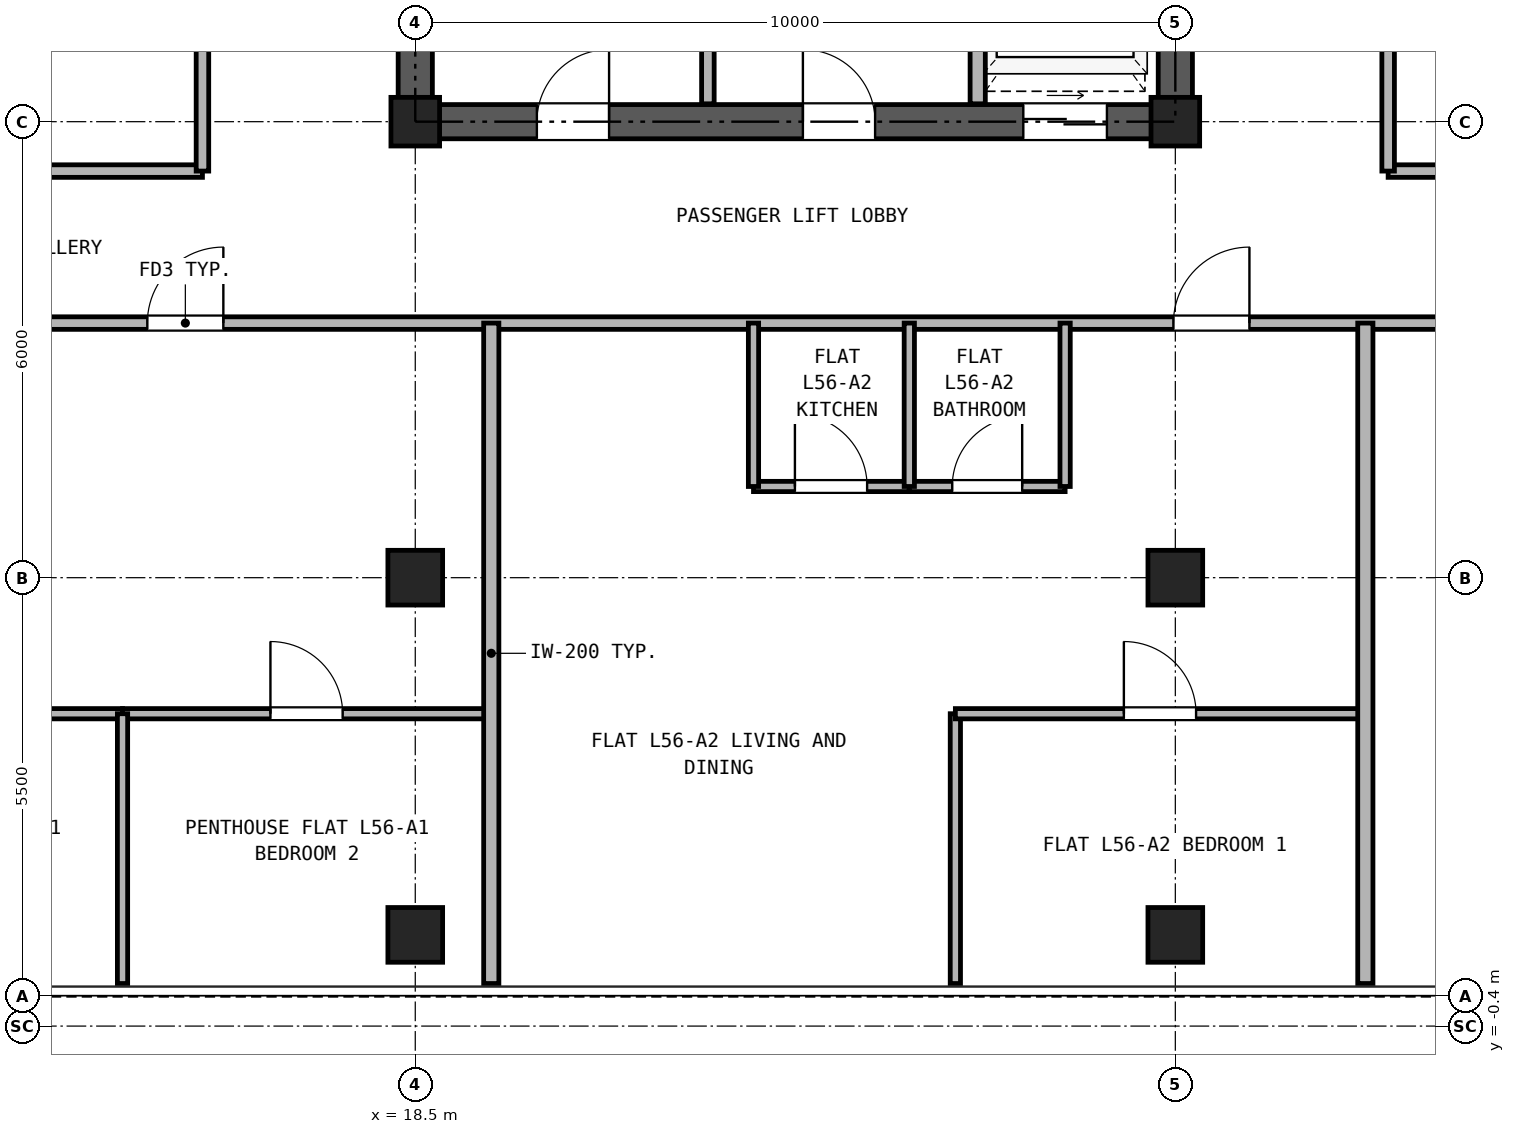
"""IFC4 building model, lengths in metres.
Left out: names, types, materials, properties, quantities, classifications, styles, units other than length and angle.
Written with IfcOpenShell. Run it as: python <this file> out.ifc"""

import sys

from ifc_helpers import new_model, si_unit, direction, frame, frame_2d, origin, origin_2d, place, context, subcontext, project, spatial, rectangle, hollow_rectangle, extrude, source, transform, mapped, element, fill, save


model = new_model("IFC4")
c1 = context("Model", 3, precision=1e-05, world=origin(), true_north=direction((0.0, 1.0)))
c2 = subcontext(c1, "Body", "Model", "MODEL_VIEW")
j1 = project(units=[si_unit("LENGTHUNIT", "METRE"), si_unit("PLANEANGLEUNIT", "RADIAN")], contexts=[c1])
p1 = place(None, origin())
s1 = spatial("IfcSite", under=j1, at=p1, CompositionType="ELEMENT")
p2 = place(p1, origin())
s2 = spatial("IfcBuilding", under=s1, at=p2, CompositionType="ELEMENT")
p3 = place(p2, frame((0.0, 0.0, 199.6)))
s3 = spatial("IfcBuildingStorey", under=s2, at=p3, CompositionType="ELEMENT", Elevation=199.6)
m1 = source(origin(), c2, "Body", "SweptSolid", [
    extrude(hollow_rectangle(XDim=0.72, YDim=0.72, WallThickness=0.04, at=origin_2d()), origin(), (0.0, 0.0, 1.0), 2.95),
])
for number, where, z_axis, x_axis in (
    (1, (18.5, 0.8, 0.0), (0.0, 0.0, 1.0), (1.0, 0.0, 0.0)),
    (2, (28.5, 0.8, 0.0), (0.0, 0.0, 1.0), (1.0, 0.0, 0.0)),
    (3, (18.5, 5.5, 0.0), (0.0, 0.0, 1.0), (1.0, 0.0, 0.0)),
):
    element("IfcColumn", number, at=place(p3, frame(where, z_axis=z_axis, x_axis=x_axis)), inside=s3, PredefinedType="COLUMN", context=c2, shape_type="MappedRepresentation", body=[
        mapped(m1, transform((0.0, 0.0, 0.0), x_axis=(1.0, 0.0, 0.0), y_axis=(0.0, 1.0, 0.0), z_axis=(0.0, 0.0, 1.0), scale=1.0)),
    ])
m2 = source(origin(), c2, "Body", "SweptSolid", [
    extrude(hollow_rectangle(XDim=0.64, YDim=0.64, WallThickness=0.035, at=origin_2d()), origin(), (0.0, 0.0, 1.0), 2.95),
])
p4 = place(p3, frame((18.5, 11.5, 0.0), z_axis=(0.0, 0.0, 1.0), x_axis=(1.0, 0.0, 0.0)))
e4 = element("IfcColumn", 4, at=p4, inside=s3, PredefinedType="COLUMN", context=c2, shape_type="MappedRepresentation", body=[
    mapped(m2, transform((0.0, 0.0, 0.0), x_axis=(1.0, 0.0, 0.0), y_axis=(0.0, 1.0, 0.0), z_axis=(0.0, 0.0, 1.0), scale=1.0)),
])
p5 = place(p3, frame((28.5, 5.5, 0.0), z_axis=(0.0, 0.0, 1.0), x_axis=(1.0, 0.0, 0.0)))
e5 = element("IfcColumn", 5, at=p5, inside=s3, PredefinedType="COLUMN", context=c2, shape_type="MappedRepresentation", body=[
    mapped(m1, transform((0.0, 0.0, 0.0), x_axis=(1.0, 0.0, 0.0), y_axis=(0.0, 1.0, 0.0), z_axis=(0.0, 0.0, 1.0), scale=1.0)),
])
p6 = place(p3, frame((28.5, 11.5, 0.0), z_axis=(0.0, 0.0, 1.0), x_axis=(1.0, 0.0, 0.0)))
e6 = element("IfcColumn", 6, at=p6, inside=s3, PredefinedType="COLUMN", context=c2, shape_type="MappedRepresentation", body=[
    mapped(m2, transform((0.0, 0.0, 0.0), x_axis=(1.0, 0.0, 0.0), y_axis=(0.0, 1.0, 0.0), z_axis=(0.0, 0.0, 1.0), scale=1.0)),
])
p7 = place(p3, frame((18.275, 11.5, 0.0), z_axis=(0.0, 0.0, 1.0), x_axis=(1.0, 0.0, 0.0)))
e7 = element("IfcWall", 7, at=p7, inside=s3, PredefinedType="SHEAR", context=c2, shape_type="SweptSolid", body=[
    extrude(rectangle(XDim=10.45, YDim=0.45, at=frame_2d((5.225, 0.0))), origin(), (0.0, 0.0, 1.0), 2.95),
])
p8 = place(p7, frame((1.825, 0.0, 0.0)))
e8 = element("IfcOpeningElement", 8, at=p8, cuts=e7, PredefinedType="OPENING", context=c2, shape_type="SweptSolid", body=[
    extrude(rectangle(XDim=0.95, YDim=2.15, at=frame_2d((0.475, 1.075))), frame((0.0, 0.235, 0.0), z_axis=(0.0, -1.0, 0.0), x_axis=(1.0, 0.0, 0.0)), (0.0, 0.0, 1.0), 0.47),
])
p9 = place(p7, frame((5.325, 0.0, 0.0)))
e9 = element("IfcOpeningElement", 9, at=p9, cuts=e7, PredefinedType="OPENING", context=c2, shape_type="SweptSolid", body=[
    extrude(rectangle(XDim=0.95, YDim=2.15, at=frame_2d((0.475, 1.075))), frame((0.0, 0.235, 0.0), z_axis=(0.0, -1.0, 0.0), x_axis=(1.0, 0.0, 0.0)), (0.0, 0.0, 1.0), 0.47),
])
p10 = place(p7, frame((8.225, 0.0, 0.0)))
e10 = element("IfcOpeningElement", 10, at=p10, cuts=e7, PredefinedType="OPENING", context=c2, shape_type="SweptSolid", body=[
    extrude(rectangle(XDim=1.1, YDim=2.25, at=frame_2d((0.55, 1.125))), frame((0.0, 0.235, 0.0), z_axis=(0.0, -1.0, 0.0), x_axis=(1.0, 0.0, 0.0)), (0.0, 0.0, 1.0), 0.47),
])
p11 = place(p3, frame((18.5, 11.725, 0.0), z_axis=(0.0, 0.0, 1.0), x_axis=(0.0, 1.0, 0.0)))
e11 = element("IfcWall", 11, at=p11, inside=s3, PredefinedType="SHEAR", context=c2, shape_type="SweptSolid", body=[
    extrude(rectangle(XDim=16.8, YDim=0.45, at=frame_2d((8.4, 0.0))), origin(), (0.0, 0.0, 1.0), 2.95),
])
p12 = place(p11, frame((7.425, 0.0, 0.0)))
e12 = element("IfcOpeningElement", 12, at=p12, cuts=e11, PredefinedType="OPENING", context=c2, shape_type="SweptSolid", body=[
    extrude(rectangle(XDim=1.15, YDim=2.2, at=frame_2d((0.575, 1.1))), frame((0.0, 0.235, 0.0), z_axis=(0.0, -1.0, 0.0), x_axis=(1.0, 0.0, 0.0)), (0.0, 0.0, 1.0), 0.47),
])
p13 = place(p3, frame((28.5, 11.725, 0.0), z_axis=(0.0, 0.0, 1.0), x_axis=(0.0, 1.0, 0.0)))
e13 = element("IfcWall", 13, at=p13, inside=s3, PredefinedType="SHEAR", context=c2, shape_type="SweptSolid", body=[
    extrude(rectangle(XDim=16.8, YDim=0.45, at=frame_2d((8.4, 0.0))), origin(), (0.0, 0.0, 1.0), 2.95),
])
p14 = place(p13, frame((7.425, 0.0, 0.0)))
e14 = element("IfcOpeningElement", 14, at=p14, cuts=e13, PredefinedType="OPENING", context=c2, shape_type="SweptSolid", body=[
    extrude(rectangle(XDim=1.15, YDim=2.2, at=frame_2d((0.575, 1.1))), frame((0.0, 0.235, 0.0), z_axis=(0.0, -1.0, 0.0), x_axis=(1.0, 0.0, 0.0)), (0.0, 0.0, 1.0), 0.47),
])
p15 = place(p3, frame((22.35, 11.735, 0.0), z_axis=(0.0, 0.0, 1.0), x_axis=(0.0, 1.0, 0.0)))
e15 = element("IfcWall", 15, at=p15, inside=s3, PredefinedType="PARTITIONING", context=c2, shape_type="SweptSolid", body=[
    extrude(rectangle(XDim=3.265, YDim=0.165, at=frame_2d((1.632, 0.0))), origin(), (0.0, 0.0, 1.0), 2.95),
])
p16 = place(p3, frame((25.9, 11.735, 0.0), z_axis=(0.0, 0.0, 1.0), x_axis=(0.0, 1.0, 0.0)))
e16 = element("IfcWall", 16, at=p16, inside=s3, PredefinedType="PARTITIONING", context=c2, shape_type="SweptSolid", body=[
    extrude(rectangle(XDim=3.265, YDim=0.2, at=frame_2d((1.632, 0.0))), origin(), (0.0, 0.0, 1.0), 2.95),
])
p17 = place(p3, frame((0.16, 8.85, 0.0), z_axis=(0.0, 0.0, 1.0), x_axis=(1.0, 0.0, 0.0)))
e17 = element("IfcWall", 17, at=p17, inside=s3, PredefinedType="PARTITIONING", context=c2, shape_type="SweptSolid", body=[
    extrude(rectangle(XDim=41.48, YDim=0.165, at=frame_2d((20.74, 0.0))), origin(), (0.0, 0.0, 1.0), 2.95),
])
p18 = place(p17, frame((14.815, 0.0, 0.0)))
e18 = element("IfcOpeningElement", 18, at=p18, cuts=e17, PredefinedType="OPENING", context=c2, shape_type="SweptSolid", body=[
    extrude(rectangle(XDim=1.0, YDim=2.15, at=frame_2d((0.5, 1.075))), frame((0.0, 0.093, 0.0), z_axis=(0.0, -1.0, 0.0), x_axis=(1.0, 0.0, 0.0)), (0.0, 0.0, 1.0), 0.185),
])
p19 = place(p17, frame((28.315, 0.0, 0.0)))
e19 = element("IfcOpeningElement", 19, at=p19, cuts=e17, PredefinedType="OPENING", context=c2, shape_type="SweptSolid", body=[
    extrude(rectangle(XDim=1.0, YDim=2.15, at=frame_2d((0.5, 1.075))), frame((0.0, 0.093, 0.0), z_axis=(0.0, -1.0, 0.0), x_axis=(1.0, 0.0, 0.0)), (0.0, 0.0, 1.0), 0.185),
])
p20 = place(p17, frame((32.615, 0.0, 0.0)))
e20 = element("IfcOpeningElement", 20, at=p20, cuts=e17, PredefinedType="OPENING", context=c2, shape_type="SweptSolid", body=[
    extrude(rectangle(XDim=1.0, YDim=2.15, at=frame_2d((0.5, 1.075))), frame((0.0, 0.093, 0.0), z_axis=(0.0, -1.0, 0.0), x_axis=(1.0, 0.0, 0.0)), (0.0, 0.0, 1.0), 0.185),
])
p21 = place(p3, frame((7.6, 10.85, 0.0), z_axis=(0.0, 0.0, 1.0), x_axis=(1.0, 0.0, 0.0)))
e21 = element("IfcWall", 21, at=p21, inside=s3, PredefinedType="PARTITIONING", context=c2, shape_type="SweptSolid", body=[
    extrude(rectangle(XDim=8.1, YDim=0.165, at=frame_2d((4.05, 0.0))), origin(), (0.0, 0.0, 1.0), 2.95),
])
p22 = place(p3, frame((31.3, 10.85, 0.0), z_axis=(0.0, 0.0, 1.0), x_axis=(1.0, 0.0, 0.0)))
e22 = element("IfcWall", 22, at=p22, inside=s3, PredefinedType="PARTITIONING", context=c2, shape_type="SweptSolid", body=[
    extrude(rectangle(XDim=6.9, YDim=0.165, at=frame_2d((3.45, 0.0))), origin(), (0.0, 0.0, 1.0), 2.95),
])
p23 = place(p3, frame((15.7, 10.85, 0.0), z_axis=(0.0, 0.0, 1.0), x_axis=(0.0, 1.0, 0.0)))
e23 = element("IfcWall", 23, at=p23, inside=s3, PredefinedType="PARTITIONING", context=c2, shape_type="SweptSolid", body=[
    extrude(rectangle(XDim=24.29, YDim=0.165, at=frame_2d((12.145, 0.0))), origin(), (0.0, 0.0, 1.0), 2.95),
])
p24 = place(p23, frame((2.825, 0.0, 0.0)))
e24 = element("IfcOpeningElement", 24, at=p24, cuts=e23, PredefinedType="OPENING", context=c2, shape_type="SweptSolid", body=[
    extrude(rectangle(XDim=0.95, YDim=2.15, at=frame_2d((0.475, 1.075))), frame((0.0, 0.093, 0.0), z_axis=(0.0, -1.0, 0.0), x_axis=(1.0, 0.0, 0.0)), (0.0, 0.0, 1.0), 0.185),
])
p25 = place(p23, frame((9.15, 0.0, 0.0)))
e25 = element("IfcOpeningElement", 25, at=p25, cuts=e23, PredefinedType="OPENING", context=c2, shape_type="SweptSolid", body=[
    extrude(rectangle(XDim=0.95, YDim=2.15, at=frame_2d((0.475, 1.075))), frame((0.0, 0.093, 0.0), z_axis=(0.0, -1.0, 0.0), x_axis=(1.0, 0.0, 0.0)), (0.0, 0.0, 1.0), 0.185),
])
p26 = place(p23, frame((15.15, 0.0, 0.0)))
e26 = element("IfcOpeningElement", 26, at=p26, cuts=e23, PredefinedType="OPENING", context=c2, shape_type="SweptSolid", body=[
    extrude(rectangle(XDim=0.95, YDim=2.15, at=frame_2d((0.475, 1.075))), frame((0.0, 0.093, 0.0), z_axis=(0.0, -1.0, 0.0), x_axis=(1.0, 0.0, 0.0)), (0.0, 0.0, 1.0), 0.185),
])
p27 = place(p23, frame((20.97, 0.0, 0.0)))
e27 = element("IfcOpeningElement", 27, at=p27, cuts=e23, PredefinedType="OPENING", context=c2, shape_type="SweptSolid", body=[
    extrude(rectangle(XDim=0.95, YDim=2.15, at=frame_2d((0.475, 1.075))), frame((0.0, 0.093, 0.0), z_axis=(0.0, -1.0, 0.0), x_axis=(1.0, 0.0, 0.0)), (0.0, 0.0, 1.0), 0.185),
])
p28 = place(p3, frame((31.3, 10.85, 0.0), z_axis=(0.0, 0.0, 1.0), x_axis=(0.0, 1.0, 0.0)))
e28 = element("IfcWall", 28, at=p28, inside=s3, PredefinedType="PARTITIONING", context=c2, shape_type="SweptSolid", body=[
    extrude(rectangle(XDim=24.29, YDim=0.165, at=frame_2d((12.145, 0.0))), origin(), (0.0, 0.0, 1.0), 2.95),
])
p29 = place(p28, frame((3.675, 0.0, 0.0)))
e29 = element("IfcOpeningElement", 29, at=p29, cuts=e28, PredefinedType="OPENING", context=c2, shape_type="SweptSolid", body=[
    extrude(rectangle(XDim=1.0, YDim=2.15, at=frame_2d((0.5, 1.075))), frame((0.0, 0.093, 0.0), z_axis=(0.0, -1.0, 0.0), x_axis=(1.0, 0.0, 0.0)), (0.0, 0.0, 1.0), 0.185),
])
p30 = place(p28, frame((11.95, 0.0, 0.0)))
e30 = element("IfcOpeningElement", 30, at=p30, cuts=e28, PredefinedType="OPENING", context=c2, shape_type="SweptSolid", body=[
    extrude(rectangle(XDim=1.0, YDim=2.15, at=frame_2d((0.5, 1.075))), frame((0.0, 0.093, 0.0), z_axis=(0.0, -1.0, 0.0), x_axis=(1.0, 0.0, 0.0)), (0.0, 0.0, 1.0), 0.185),
])
p31 = place(p28, frame((17.75, 0.0, 0.0)))
e31 = element("IfcOpeningElement", 31, at=p31, cuts=e28, PredefinedType="OPENING", context=c2, shape_type="SweptSolid", body=[
    extrude(rectangle(XDim=1.0, YDim=2.15, at=frame_2d((0.5, 1.075))), frame((0.0, 0.093, 0.0), z_axis=(0.0, -1.0, 0.0), x_axis=(1.0, 0.0, 0.0)), (0.0, 0.0, 1.0), 0.185),
])
p32 = place(p3, frame((9.797, 3.71, 0.0), z_axis=(0.0, 0.0, 1.0), x_axis=(1.0, 0.0, 0.0)))
e32 = element("IfcWall", 32, at=p32, inside=s3, PredefinedType="PARTITIONING", context=c2, shape_type="SweptSolid", body=[
    extrude(rectangle(XDim=4.851, YDim=0.135, at=frame_2d((2.426, 0.0))), origin(), (0.0, 0.0, 1.0), 2.95),
])
p33 = place(p32, frame((1.946, 0.0, 0.0)))
e33 = element("IfcOpeningElement", 33, at=p33, cuts=e32, PredefinedType="OPENING", context=c2, shape_type="SweptSolid", body=[
    extrude(rectangle(XDim=0.95, YDim=2.15, at=frame_2d((0.475, 1.075))), frame((0.0, 0.077, 0.0), z_axis=(0.0, -1.0, 0.0), x_axis=(1.0, 0.0, 0.0)), (0.0, 0.0, 1.0), 0.155),
])
p34 = place(p3, frame((14.648, 3.71, 0.0), z_axis=(0.0, 0.0, 1.0), x_axis=(1.0, 0.0, 0.0)))
e34 = element("IfcWall", 34, at=p34, inside=s3, PredefinedType="PARTITIONING", context=c2, shape_type="SweptSolid", body=[
    extrude(rectangle(XDim=4.852, YDim=0.135, at=frame_2d((2.426, 0.0))), origin(), (0.0, 0.0, 1.0), 2.95),
])
p35 = place(p34, frame((1.946, 0.0, 0.0)))
e35 = element("IfcOpeningElement", 35, at=p35, cuts=e34, PredefinedType="OPENING", context=c2, shape_type="SweptSolid", body=[
    extrude(rectangle(XDim=0.95, YDim=2.15, at=frame_2d((0.475, 1.075))), frame((0.0, 0.077, 0.0), z_axis=(0.0, -1.0, 0.0), x_axis=(1.0, 0.0, 0.0)), (0.0, 0.0, 1.0), 0.155),
])
p36 = place(p3, frame((14.648, 0.16, 0.0), z_axis=(0.0, 0.0, 1.0), x_axis=(0.0, 1.0, 0.0)))
e36 = element("IfcWall", 36, at=p36, inside=s3, PredefinedType="PARTITIONING", context=c2, shape_type="SweptSolid", body=[
    extrude(rectangle(XDim=3.55, YDim=0.135, at=frame_2d((1.775, 0.0))), origin(), (0.0, 0.0, 1.0), 2.95),
])
p37 = place(p3, frame((19.5, 0.16, 0.0), z_axis=(0.0, 0.0, 1.0), x_axis=(0.0, 1.0, 0.0)))
e37 = element("IfcWall", 37, at=p37, inside=s3, PredefinedType="PARTITIONING", context=c2, shape_type="SweptSolid", body=[
    extrude(rectangle(XDim=8.69, YDim=0.2, at=frame_2d((4.345, 0.0))), origin(), (0.0, 0.0, 1.0), 2.95),
])
p38 = place(p3, frame((22.95, 6.7, 0.0), z_axis=(0.0, 0.0, 1.0), x_axis=(1.0, 0.0, 0.0)))
e38 = element("IfcWall", 38, at=p38, inside=s3, PredefinedType="PARTITIONING", context=c2, shape_type="SweptSolid", body=[
    extrude(rectangle(XDim=2.05, YDim=0.135, at=frame_2d((1.025, 0.0))), origin(), (0.0, 0.0, 1.0), 2.95),
])
p39 = place(p38, frame((0.545, 0.0, 0.0)))
e39 = element("IfcOpeningElement", 39, at=p39, cuts=e38, PredefinedType="OPENING", context=c2, shape_type="SweptSolid", body=[
    extrude(rectangle(XDim=0.95, YDim=2.15, at=frame_2d((0.475, 1.075))), frame((0.0, 0.077, 0.0), z_axis=(0.0, -1.0, 0.0), x_axis=(1.0, 0.0, 0.0)), (0.0, 0.0, 1.0), 0.155),
])
p40 = place(p3, frame((25.0, 6.7, 0.0), z_axis=(0.0, 0.0, 1.0), x_axis=(1.0, 0.0, 0.0)))
e40 = element("IfcWall", 40, at=p40, inside=s3, PredefinedType="PARTITIONING", context=c2, shape_type="SweptSolid", body=[
    extrude(rectangle(XDim=2.05, YDim=0.135, at=frame_2d((1.025, 0.0))), origin(), (0.0, 0.0, 1.0), 2.95),
])
p41 = place(p40, frame((0.565, 0.0, 0.0)))
e41 = element("IfcOpeningElement", 41, at=p41, cuts=e40, PredefinedType="OPENING", context=c2, shape_type="SweptSolid", body=[
    extrude(rectangle(XDim=0.92, YDim=2.1, at=frame_2d((0.46, 1.05))), frame((0.0, 0.077, 0.0), z_axis=(0.0, -1.0, 0.0), x_axis=(1.0, 0.0, 0.0)), (0.0, 0.0, 1.0), 0.155),
])
for number, where, z_axis, x_axis in (
    (42, (22.95, 6.7, 0.0), (0.0, 0.0, 1.0), (0.0, 1.0, 0.0)),
    (43, (25.0, 6.7, 0.0), (0.0, 0.0, 1.0), (0.0, 1.0, 0.0)),
    (44, (27.05, 6.7, 0.0), (0.0, 0.0, 1.0), (0.0, 1.0, 0.0)),
):
    element("IfcWall", number, at=place(p3, frame(where, z_axis=z_axis, x_axis=x_axis)), inside=s3, PredefinedType="PARTITIONING", context=c2, shape_type="SweptSolid", body=[
        extrude(rectangle(XDim=2.15, YDim=0.135, at=frame_2d((1.075, 0.0))), origin(), (0.0, 0.0, 1.0), 2.95),
    ])
p42 = place(p3, frame((25.606, 0.16, 0.0), z_axis=(0.0, 0.0, 1.0), x_axis=(0.0, 1.0, 0.0)))
e45 = element("IfcWall", 45, at=p42, inside=s3, PredefinedType="PARTITIONING", context=c2, shape_type="SweptSolid", body=[
    extrude(rectangle(XDim=3.55, YDim=0.135, at=frame_2d((1.775, 0.0))), origin(), (0.0, 0.0, 1.0), 2.95),
])
p43 = place(p3, frame((25.606, 3.71, 0.0), z_axis=(0.0, 0.0, 1.0), x_axis=(1.0, 0.0, 0.0)))
e46 = element("IfcWall", 46, at=p43, inside=s3, PredefinedType="PARTITIONING", context=c2, shape_type="SweptSolid", body=[
    extrude(rectangle(XDim=5.394, YDim=0.135, at=frame_2d((2.697, 0.0))), origin(), (0.0, 0.0, 1.0), 2.95),
])
p44 = place(p43, frame((2.217, 0.0, 0.0)))
e47 = element("IfcOpeningElement", 47, at=p44, cuts=e46, PredefinedType="OPENING", context=c2, shape_type="SweptSolid", body=[
    extrude(rectangle(XDim=0.95, YDim=2.15, at=frame_2d((0.475, 1.075))), frame((0.0, 0.077, 0.0), z_axis=(0.0, -1.0, 0.0), x_axis=(1.0, 0.0, 0.0)), (0.0, 0.0, 1.0), 0.155),
])
p45 = place(p3, frame((31.0, 0.16, 0.0), z_axis=(0.0, 0.0, 1.0), x_axis=(0.0, 1.0, 0.0)))
e48 = element("IfcWall", 48, at=p45, inside=s3, PredefinedType="PARTITIONING", context=c2, shape_type="SweptSolid", body=[
    extrude(rectangle(XDim=8.69, YDim=0.2, at=frame_2d((4.345, 0.0))), origin(), (0.0, 0.0, 1.0), 2.95),
])
p46 = place(p8, frame((0.95, 0.0, 0.0), z_axis=(0.0, 0.0, 1.0), x_axis=(-1.0, 0.0, 0.0)))
e49 = element("IfcDoor", 49, at=p46, inside=s3, OperationType="SINGLE_SWING_RIGHT", PredefinedType="DOOR", context=c2, shape_type="SweptSolid", body=[
    extrude(rectangle(XDim=0.95, YDim=2.15, at=frame_2d((0.475, 1.075))), frame((0.0, 0.025, 0.0), z_axis=(0.0, -1.0, 0.0), x_axis=(1.0, 0.0, 0.0)), (0.0, 0.0, 1.0), 0.05),
])
fill(e8, e49)
p47 = place(p9, frame((0.95, 0.0, 0.0), z_axis=(0.0, 0.0, 1.0), x_axis=(-1.0, 0.0, 0.0)))
e50 = element("IfcDoor", 50, at=p47, inside=s3, OperationType="SINGLE_SWING_LEFT", PredefinedType="DOOR", context=c2, shape_type="SweptSolid", body=[
    extrude(rectangle(XDim=0.95, YDim=2.15, at=frame_2d((0.475, 1.075))), frame((0.0, 0.025, 0.0), z_axis=(0.0, -1.0, 0.0), x_axis=(1.0, 0.0, 0.0)), (0.0, 0.0, 1.0), 0.05),
])
fill(e9, e50)
p48 = place(p10, frame((1.1, 0.0, 0.0), z_axis=(0.0, 0.0, 1.0), x_axis=(-1.0, 0.0, 0.0)))
e51 = element("IfcDoor", 51, at=p48, inside=s3, OperationType="DOUBLE_DOOR_SLIDING", PredefinedType="DOOR", context=c2, shape_type="SweptSolid", body=[
    extrude(rectangle(XDim=1.1, YDim=2.25, at=frame_2d((0.55, 1.125))), frame((0.0, 0.025, 0.0), z_axis=(0.0, -1.0, 0.0), x_axis=(1.0, 0.0, 0.0)), (0.0, 0.0, 1.0), 0.05),
])
fill(e10, e51)
p49 = place(p35, frame((0.95, 0.0, 0.0), z_axis=(0.0, 0.0, 1.0), x_axis=(-1.0, 0.0, 0.0)))
e52 = element("IfcDoor", 52, at=p49, inside=s3, OperationType="SINGLE_SWING_LEFT", PredefinedType="DOOR", context=c2, shape_type="SweptSolid", body=[
    extrude(rectangle(XDim=0.95, YDim=2.15, at=frame_2d((0.475, 1.075))), frame((0.0, 0.025, 0.0), z_axis=(0.0, -1.0, 0.0), x_axis=(1.0, 0.0, 0.0)), (0.0, 0.0, 1.0), 0.05),
])
fill(e35, e52)
p50 = place(p18, frame((1.0, 0.0, 0.0), z_axis=(0.0, 0.0, 1.0), x_axis=(-1.0, 0.0, 0.0)))
e53 = element("IfcDoor", 53, at=p50, inside=s3, OperationType="SINGLE_SWING_RIGHT", PredefinedType="DOOR", context=c2, shape_type="SweptSolid", body=[
    extrude(rectangle(XDim=1.0, YDim=2.15, at=frame_2d((0.5, 1.075))), frame((0.0, 0.025, 0.0), z_axis=(0.0, -1.0, 0.0), x_axis=(1.0, 0.0, 0.0)), (0.0, 0.0, 1.0), 0.05),
])
fill(e18, e53)
p51 = place(p39, origin())
e54 = element("IfcDoor", 54, at=p51, inside=s3, OperationType="SINGLE_SWING_LEFT", PredefinedType="DOOR", context=c2, shape_type="SweptSolid", body=[
    extrude(rectangle(XDim=0.95, YDim=2.15, at=frame_2d((0.475, 1.075))), frame((0.0, 0.025, 0.0), z_axis=(0.0, -1.0, 0.0), x_axis=(1.0, 0.0, 0.0)), (0.0, 0.0, 1.0), 0.05),
])
fill(e39, e54)
p52 = place(p41, origin())
e55 = element("IfcDoor", 55, at=p52, inside=s3, OperationType="SINGLE_SWING_RIGHT", PredefinedType="DOOR", context=c2, shape_type="SweptSolid", body=[
    extrude(rectangle(XDim=0.92, YDim=2.1, at=frame_2d((0.46, 1.05))), frame((0.0, 0.025, 0.0), z_axis=(0.0, -1.0, 0.0), x_axis=(1.0, 0.0, 0.0)), (0.0, 0.0, 1.0), 0.05),
])
fill(e41, e55)
p53 = place(p44, frame((0.95, 0.0, 0.0), z_axis=(0.0, 0.0, 1.0), x_axis=(-1.0, 0.0, 0.0)))
e56 = element("IfcDoor", 56, at=p53, inside=s3, OperationType="SINGLE_SWING_LEFT", PredefinedType="DOOR", context=c2, shape_type="SweptSolid", body=[
    extrude(rectangle(XDim=0.95, YDim=2.15, at=frame_2d((0.475, 1.075))), frame((0.0, 0.025, 0.0), z_axis=(0.0, -1.0, 0.0), x_axis=(1.0, 0.0, 0.0)), (0.0, 0.0, 1.0), 0.05),
])
fill(e47, e56)
p54 = place(p19, frame((1.0, 0.0, 0.0), z_axis=(0.0, 0.0, 1.0), x_axis=(-1.0, 0.0, 0.0)))
e57 = element("IfcDoor", 57, at=p54, inside=s3, OperationType="SINGLE_SWING_RIGHT", PredefinedType="DOOR", context=c2, shape_type="SweptSolid", body=[
    extrude(rectangle(XDim=1.0, YDim=2.15, at=frame_2d((0.5, 1.075))), frame((0.0, 0.025, 0.0), z_axis=(0.0, -1.0, 0.0), x_axis=(1.0, 0.0, 0.0)), (0.0, 0.0, 1.0), 0.05),
])
fill(e19, e57)
save(model, sys.argv[1])
